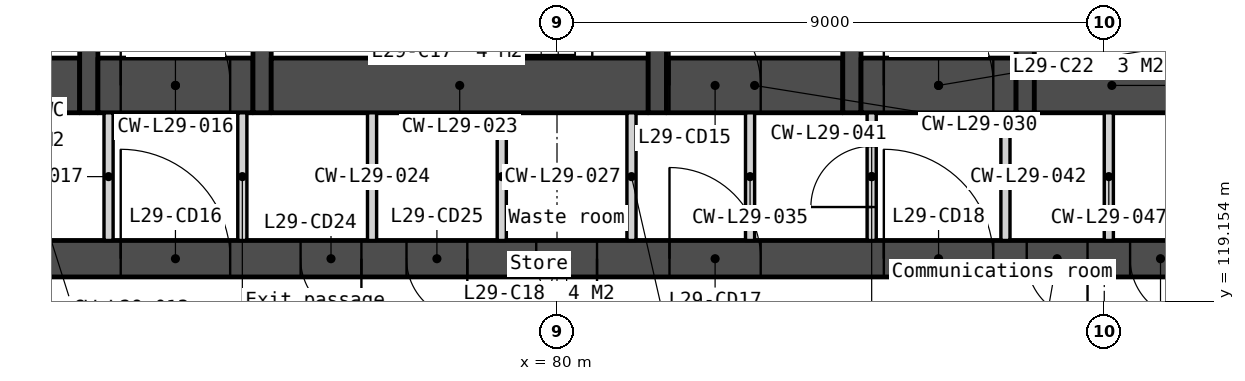
"""IFC4 building model, lengths in metres.
Left out: names, types, materials, properties, quantities, classifications, styles, units other than length and angle.
Written with IfcOpenShell. Run it as: python <this file> out.ifc"""

import sys

from ifc_helpers import new_model, si_unit, direction, frame, frame_2d, origin, place, context, subcontext, project, spatial, polyline, rectangle, outline, extrude, element, fill, save


model = new_model("IFC4")
c1 = context("Model", 3, precision=1e-05, world=origin(), true_north=direction((0.0, 1.0)))
c2 = subcontext(c1, "Body", "Model", "MODEL_VIEW")
j1 = project(units=[si_unit("LENGTHUNIT", "METRE"), si_unit("PLANEANGLEUNIT", "RADIAN")], contexts=[c1])
p1 = place(None, origin())
s1 = spatial("IfcSite", under=j1, at=p1, CompositionType="ELEMENT")
p2 = place(p1, origin())
s2 = spatial("IfcBuilding", under=s1, at=p2, CompositionType="ELEMENT")
p3 = place(p2, frame((0.0, 0.0, 116.8)))
s3 = spatial("IfcBuildingStorey", under=s2, at=p3, CompositionType="ELEMENT", Elevation=116.8)
p4 = place(p3, frame((66.0, 119.85, 0.0), z_axis=(0.0, 0.0, 1.0), x_axis=(1.0, 0.0, 0.0)))
e1 = element("IfcWall", 1, at=p4, inside=s3, PredefinedType="SOLIDWALL", context=c2, shape_type="SweptSolid", body=[
    extrude(rectangle(XDim=28.0, YDim=0.6, at=frame_2d((14.0, 0.0))), origin(), (0.0, 0.0, 1.0), 3.35),
])
p5 = place(p4, frame((6.825, 0.0, 0.0)))
e2 = element("IfcOpeningElement", 2, at=p5, cuts=e1, PredefinedType="OPENING", context=c2, shape_type="SweptSolid", body=[
    extrude(rectangle(XDim=1.8, YDim=2.1, at=frame_2d((0.9, 1.05))), frame((0.0, 0.31, 0.0), z_axis=(0.0, -1.0, 0.0), x_axis=(1.0, 0.0, 0.0)), (0.0, 0.0, 1.0), 0.62),
])
p6 = place(p4, frame((15.85, 0.0, 0.0)))
e3 = element("IfcOpeningElement", 3, at=p6, cuts=e1, PredefinedType="OPENING", context=c2, shape_type="SweptSolid", body=[
    extrude(rectangle(XDim=1.5, YDim=2.1, at=frame_2d((0.75, 1.05))), frame((0.0, 0.31, 0.0), z_axis=(0.0, -1.0, 0.0), x_axis=(1.0, 0.0, 0.0)), (0.0, 0.0, 1.0), 0.62),
])
p7 = place(p4, frame((19.375, 0.0, 0.0)))
e4 = element("IfcOpeningElement", 4, at=p7, cuts=e1, PredefinedType="OPENING", context=c2, shape_type="SweptSolid", body=[
    extrude(rectangle(XDim=1.8, YDim=2.1, at=frame_2d((0.9, 1.05))), frame((0.0, 0.31, 0.0), z_axis=(0.0, -1.0, 0.0), x_axis=(1.0, 0.0, 0.0)), (0.0, 0.0, 1.0), 0.62),
])
p8 = place(p4, frame((4.425, 0.0, 0.0)))
e5 = element("IfcOpeningElement", 5, at=p8, cuts=e1, PredefinedType="OPENING", context=c2, shape_type="SweptSolid", body=[
    extrude(rectangle(XDim=1.0, YDim=2.1, at=frame_2d((0.5, 1.05))), frame((0.0, 0.31, 0.0), z_axis=(0.0, -1.0, 0.0), x_axis=(1.0, 0.0, 0.0)), (0.0, 0.0, 1.0), 0.62),
])
p9 = place(p4, frame((9.783, 0.0, 0.0)))
e6 = element("IfcOpeningElement", 6, at=p9, cuts=e1, PredefinedType="OPENING", context=c2, shape_type="SweptSolid", body=[
    extrude(rectangle(XDim=1.0, YDim=2.1, at=frame_2d((0.5, 1.05))), frame((0.0, 0.31, 0.0), z_axis=(0.0, -1.0, 0.0), x_axis=(1.0, 0.0, 0.0)), (0.0, 0.0, 1.0), 0.62),
])
p10 = place(p4, frame((11.525, 0.0, 0.0)))
e7 = element("IfcOpeningElement", 7, at=p10, cuts=e1, PredefinedType="OPENING", context=c2, shape_type="SweptSolid", body=[
    extrude(rectangle(XDim=1.0, YDim=2.1, at=frame_2d((0.5, 1.05))), frame((0.0, 0.31, 0.0), z_axis=(0.0, -1.0, 0.0), x_axis=(1.0, 0.0, 0.0)), (0.0, 0.0, 1.0), 0.62),
])
p11 = place(p4, frame((13.658, 0.0, 0.0)))
e8 = element("IfcOpeningElement", 8, at=p11, cuts=e1, PredefinedType="OPENING", context=c2, shape_type="SweptSolid", body=[
    extrude(rectangle(XDim=1.0, YDim=2.1, at=frame_2d((0.5, 1.05))), frame((0.0, 0.31, 0.0), z_axis=(0.0, -1.0, 0.0), x_axis=(1.0, 0.0, 0.0)), (0.0, 0.0, 1.0), 0.62),
])
p12 = place(p4, frame((21.725, 0.0, 0.0)))
e9 = element("IfcOpeningElement", 9, at=p12, cuts=e1, PredefinedType="OPENING", context=c2, shape_type="SweptSolid", body=[
    extrude(rectangle(XDim=1.0, YDim=2.1, at=frame_2d((0.5, 1.05))), frame((0.0, 0.31, 0.0), z_axis=(0.0, -1.0, 0.0), x_axis=(1.0, 0.0, 0.0)), (0.0, 0.0, 1.0), 0.62),
])
p13 = place(p4, frame((23.425, 0.0, 0.0)))
e10 = element("IfcOpeningElement", 10, at=p13, cuts=e1, PredefinedType="OPENING", context=c2, shape_type="SweptSolid", body=[
    extrude(rectangle(XDim=1.0, YDim=2.1, at=frame_2d((0.5, 1.05))), frame((0.0, 0.31, 0.0), z_axis=(0.0, -1.0, 0.0), x_axis=(1.0, 0.0, 0.0)), (0.0, 0.0, 1.0), 0.62),
])
p14 = place(p3, frame((69.6, 122.7, 0.0), z_axis=(0.0, 0.0, 1.0), x_axis=(1.0, 0.0, 0.0)))
e11 = element("IfcWall", 11, at=p14, inside=s3, PredefinedType="SOLIDWALL", context=c2, shape_type="SweptSolid", body=[
    extrude(rectangle(XDim=2.55, YDim=0.9, at=frame_2d((1.275, 0.0))), origin(), (0.0, 0.0, 1.0), 3.35),
])
p15 = place(p3, frame((72.3, 133.95, 0.0), z_axis=(0.0, 0.0, 1.0), x_axis=(0.0, -1.0, 0.0)))
e12 = element("IfcWall", 12, at=p15, inside=s3, PredefinedType="SOLIDWALL", context=c2, shape_type="SweptSolid", body=[
    extrude(rectangle(XDim=11.7, YDim=0.3, at=frame_2d((5.85, 0.0))), origin(), (0.0, 0.0, 1.0), 3.35),
])
p16 = place(p15, frame((6.95, 0.0, 0.0)))
e13 = element("IfcOpeningElement", 13, at=p16, cuts=e12, PredefinedType="OPENING", context=c2, shape_type="SweptSolid", body=[
    extrude(rectangle(XDim=1.1, YDim=2.1, at=frame_2d((0.55, 1.05))), frame((0.0, 0.16, 0.0), z_axis=(0.0, -1.0, 0.0), x_axis=(1.0, 0.0, 0.0)), (0.0, 0.0, 1.0), 0.32),
])
p17 = place(p15, frame((9.35, 0.0, 0.0)))
e14 = element("IfcOpeningElement", 14, at=p17, cuts=e12, PredefinedType="OPENING", context=c2, shape_type="SweptSolid", body=[
    extrude(rectangle(XDim=0.9, YDim=2.1, at=frame_2d((0.45, 1.05))), frame((0.0, 0.16, 0.0), z_axis=(0.0, -1.0, 0.0), x_axis=(1.0, 0.0, 0.0)), (0.0, 0.0, 1.0), 0.32),
])
p18 = place(p15, frame((5.1, 0.0, 0.0)))
e15 = element("IfcOpeningElement", 15, at=p18, cuts=e12, PredefinedType="OPENING", context=c2, shape_type="SweptSolid", body=[
    extrude(rectangle(XDim=1.0, YDim=2.1, at=frame_2d((0.5, 1.05))), frame((0.0, 0.16, 0.0), z_axis=(0.0, -1.0, 0.0), x_axis=(1.0, 0.0, 0.0)), (0.0, 0.0, 1.0), 0.32),
])
p19 = place(p3, frame((72.45, 122.7, 0.0), z_axis=(0.0, 0.0, 1.0), x_axis=(1.0, 0.0, 0.0)))
e16 = element("IfcWall", 16, at=p19, inside=s3, PredefinedType="SOLIDWALL", context=c2, shape_type="SweptSolid", body=[
    extrude(rectangle(XDim=2.55, YDim=0.9, at=frame_2d((1.275, 0.0))), origin(), (0.0, 0.0, 1.0), 3.35),
])
p20 = place(p19, frame((0.375, 0.0, 0.0)))
e17 = element("IfcOpeningElement", 17, at=p20, cuts=e16, PredefinedType="OPENING", context=c2, shape_type="SweptSolid", body=[
    extrude(rectangle(XDim=1.8, YDim=2.1, at=frame_2d((0.9, 1.05))), frame((0.0, 0.46, 0.0), z_axis=(0.0, -1.0, 0.0), x_axis=(1.0, 0.0, 0.0)), (0.0, 0.0, 1.0), 0.92),
])
for number, where, z_axis, x_axis in (
    (18, (72.625, 122.25, 0.0), (0.0, 0.0, 1.0), (0.0, -1.0, 0.0)),
    (19, (74.825, 122.25, 0.0), (0.0, 0.0, 1.0), (0.0, -1.0, 0.0)),
):
    element("IfcWall", number, at=place(p3, frame(where, z_axis=z_axis, x_axis=x_axis)), inside=s3, PredefinedType="PARTITIONING", context=c2, shape_type="SweptSolid", body=[
        extrude(rectangle(XDim=2.1, YDim=0.15, at=frame_2d((1.05, 0.0))), origin(), (0.0, 0.0, 1.0), 3.35),
    ])
p21 = place(p3, frame((75.15, 133.95, 0.0), z_axis=(0.0, 0.0, 1.0), x_axis=(0.0, -1.0, 0.0)))
e20 = element("IfcWall", 20, at=p21, inside=s3, PredefinedType="SOLIDWALL", context=c2, shape_type="SweptSolid", body=[
    extrude(rectangle(XDim=11.7, YDim=0.3, at=frame_2d((5.85, 0.0))), origin(), (0.0, 0.0, 1.0), 3.35),
])
p22 = place(p3, frame((75.3, 122.7, 0.0), z_axis=(0.0, 0.0, 1.0), x_axis=(1.0, 0.0, 0.0)))
e21 = element("IfcWall", 21, at=p22, inside=s3, PredefinedType="SOLIDWALL", context=c2, shape_type="SweptSolid", body=[
    extrude(rectangle(XDim=6.2, YDim=0.9, at=frame_2d((3.1, 0.0))), origin(), (0.0, 0.0, 1.0), 3.35),
])
for number, where, z_axis, x_axis in (
    (22, (76.958, 122.25, 0.0), (0.0, 0.0, 1.0), (0.0, -1.0, 0.0)),
    (23, (79.092, 122.25, 0.0), (0.0, 0.0, 1.0), (0.0, -1.0, 0.0)),
    (24, (81.225, 122.25, 0.0), (0.0, 0.0, 1.0), (0.0, -1.0, 0.0)),
):
    element("IfcWall", number, at=place(p3, frame(where, z_axis=z_axis, x_axis=x_axis)), inside=s3, PredefinedType="PARTITIONING", context=c2, shape_type="SweptSolid", body=[
        extrude(rectangle(XDim=2.1, YDim=0.15, at=frame_2d((1.05, 0.0))), origin(), (0.0, 0.0, 1.0), 3.35),
    ])
p23 = place(p3, frame((81.65, 125.7, 0.0), z_axis=(0.0, 0.0, 1.0), x_axis=(0.0, -1.0, 0.0)))
e25 = element("IfcWall", 25, at=p23, inside=s3, PredefinedType="SOLIDWALL", context=c2, shape_type="SweptSolid", body=[
    extrude(rectangle(XDim=3.45, YDim=0.3, at=frame_2d((1.725, 0.0))), origin(), (0.0, 0.0, 1.0), 3.35),
])
p24 = place(p23, frame((0.75, 0.0, 0.0)))
e26 = element("IfcOpeningElement", 26, at=p24, cuts=e25, PredefinedType="OPENING", context=c2, shape_type="SweptSolid", body=[
    extrude(rectangle(XDim=1.0, YDim=2.1, at=frame_2d((0.5, 1.05))), frame((0.0, 0.16, 0.0), z_axis=(0.0, -1.0, 0.0), x_axis=(1.0, 0.0, 0.0)), (0.0, 0.0, 1.0), 0.32),
])
p25 = place(p3, frame((81.8, 122.7, 0.0), z_axis=(0.0, 0.0, 1.0), x_axis=(1.0, 0.0, 0.0)))
e27 = element("IfcWall", 27, at=p25, inside=s3, PredefinedType="SOLIDWALL", context=c2, shape_type="SweptSolid", body=[
    extrude(rectangle(XDim=2.9, YDim=0.9, at=frame_2d((1.45, 0.0))), origin(), (0.0, 0.0, 1.0), 3.35),
])
p26 = place(p25, frame((0.05, 0.0, 0.0)))
e28 = element("IfcOpeningElement", 28, at=p26, cuts=e27, PredefinedType="OPENING", context=c2, shape_type="SweptSolid", body=[
    extrude(rectangle(XDim=1.5, YDim=2.1, at=frame_2d((0.75, 1.05))), frame((0.0, 0.46, 0.0), z_axis=(0.0, -1.0, 0.0), x_axis=(1.0, 0.0, 0.0)), (0.0, 0.0, 1.0), 0.92),
])
p27 = place(p3, frame((83.175, 122.25, 0.0), z_axis=(0.0, 0.0, 1.0), x_axis=(0.0, -1.0, 0.0)))
e29 = element("IfcWall", 29, at=p27, inside=s3, PredefinedType="PARTITIONING", context=c2, shape_type="SweptSolid", body=[
    extrude(rectangle(XDim=2.1, YDim=0.15, at=frame_2d((1.05, 0.0))), origin(), (0.0, 0.0, 1.0), 3.35),
])
p28 = place(p3, frame((84.85, 133.95, 0.0), z_axis=(0.0, 0.0, 1.0), x_axis=(0.0, -1.0, 0.0)))
e30 = element("IfcWall", 30, at=p28, inside=s3, PredefinedType="SOLIDWALL", context=c2, shape_type="SweptSolid", body=[
    extrude(rectangle(XDim=11.7, YDim=0.3, at=frame_2d((5.85, 0.0))), origin(), (0.0, 0.0, 1.0), 3.35),
])
p29 = place(p3, frame((85.0, 122.7, 0.0), z_axis=(0.0, 0.0, 1.0), x_axis=(1.0, 0.0, 0.0)))
e31 = element("IfcWall", 31, at=p29, inside=s3, PredefinedType="SOLIDWALL", context=c2, shape_type="SweptSolid", body=[
    extrude(rectangle(XDim=2.55, YDim=0.9, at=frame_2d((1.275, 0.0))), origin(), (0.0, 0.0, 1.0), 3.35),
])
p30 = place(p29, frame((0.375, 0.0, 0.0)))
e32 = element("IfcOpeningElement", 32, at=p30, cuts=e31, PredefinedType="OPENING", context=c2, shape_type="SweptSolid", body=[
    extrude(rectangle(XDim=1.8, YDim=2.1, at=frame_2d((0.9, 1.05))), frame((0.0, 0.46, 0.0), z_axis=(0.0, -1.0, 0.0), x_axis=(1.0, 0.0, 0.0)), (0.0, 0.0, 1.0), 0.92),
])
p31 = place(p3, frame((85.175, 122.25, 0.0), z_axis=(0.0, 0.0, 1.0), x_axis=(0.0, -1.0, 0.0)))
e33 = element("IfcWall", 33, at=p31, inside=s3, PredefinedType="PARTITIONING", context=c2, shape_type="SweptSolid", body=[
    extrude(rectangle(XDim=2.1, YDim=0.15, at=frame_2d((1.05, 0.0))), origin(), (0.0, 0.0, 1.0), 3.35),
])
p32 = place(p31, frame((0.55, 0.0, 0.0)))
e34 = element("IfcOpeningElement", 34, at=p32, cuts=e33, PredefinedType="OPENING", context=c2, shape_type="SweptSolid", body=[
    extrude(rectangle(XDim=1.0, YDim=2.1, at=frame_2d((0.5, 1.05))), frame((0.0, 0.085, 0.0), z_axis=(0.0, -1.0, 0.0), x_axis=(1.0, 0.0, 0.0)), (0.0, 0.0, 1.0), 0.17),
])
p33 = place(p3, frame((87.375, 122.25, 0.0), z_axis=(0.0, 0.0, 1.0), x_axis=(0.0, -1.0, 0.0)))
e35 = element("IfcWall", 35, at=p33, inside=s3, PredefinedType="PARTITIONING", context=c2, shape_type="SweptSolid", body=[
    extrude(rectangle(XDim=2.1, YDim=0.15, at=frame_2d((1.05, 0.0))), origin(), (0.0, 0.0, 1.0), 3.35),
])
p34 = place(p3, frame((87.7, 133.95, 0.0), z_axis=(0.0, 0.0, 1.0), x_axis=(0.0, -1.0, 0.0)))
e36 = element("IfcWall", 36, at=p34, inside=s3, PredefinedType="SOLIDWALL", context=c2, shape_type="SweptSolid", body=[
    extrude(rectangle(XDim=11.7, YDim=0.3, at=frame_2d((5.85, 0.0))), origin(), (0.0, 0.0, 1.0), 3.35),
])
p35 = place(p34, frame((6.95, 0.0, 0.0)))
e37 = element("IfcOpeningElement", 37, at=p35, cuts=e36, PredefinedType="OPENING", context=c2, shape_type="SweptSolid", body=[
    extrude(rectangle(XDim=1.1, YDim=2.1, at=frame_2d((0.55, 1.05))), frame((0.0, 0.16, 0.0), z_axis=(0.0, -1.0, 0.0), x_axis=(1.0, 0.0, 0.0)), (0.0, 0.0, 1.0), 0.32),
])
p36 = place(p34, frame((5.1, 0.0, 0.0)))
e38 = element("IfcOpeningElement", 38, at=p36, cuts=e36, PredefinedType="OPENING", context=c2, shape_type="SweptSolid", body=[
    extrude(rectangle(XDim=1.0, YDim=2.1, at=frame_2d((0.5, 1.05))), frame((0.0, 0.16, 0.0), z_axis=(0.0, -1.0, 0.0), x_axis=(1.0, 0.0, 0.0)), (0.0, 0.0, 1.0), 0.32),
])
p37 = place(p34, frame((9.25, 0.0, 0.0)))
e39 = element("IfcOpeningElement", 39, at=p37, cuts=e36, PredefinedType="OPENING", context=c2, shape_type="SweptSolid", body=[
    extrude(rectangle(XDim=1.1, YDim=2.1, at=frame_2d((0.55, 1.05))), frame((0.0, 0.16, 0.0), z_axis=(0.0, -1.0, 0.0), x_axis=(1.0, 0.0, 0.0)), (0.0, 0.0, 1.0), 0.32),
])
p38 = place(p3, frame((87.85, 122.7, 0.0), z_axis=(0.0, 0.0, 1.0), x_axis=(1.0, 0.0, 0.0)))
e40 = element("IfcWall", 40, at=p38, inside=s3, PredefinedType="SOLIDWALL", context=c2, shape_type="SweptSolid", body=[
    extrude(rectangle(XDim=2.55, YDim=0.9, at=frame_2d((1.275, 0.0))), origin(), (0.0, 0.0, 1.0), 3.35),
])
p39 = place(p3, frame((89.075, 122.25, 0.0), z_axis=(0.0, 0.0, 1.0), x_axis=(0.0, -1.0, 0.0)))
e41 = element("IfcWall", 41, at=p39, inside=s3, PredefinedType="PARTITIONING", context=c2, shape_type="SweptSolid", body=[
    extrude(rectangle(XDim=2.1, YDim=0.15, at=frame_2d((1.05, 0.0))), origin(), (0.0, 0.0, 1.0), 3.35),
])
p40 = place(p3, frame((56.073, 130.263, -0.15), z_axis=(0.0, 0.0, 1.0), x_axis=(0.500000478905, -0.866025127289, 0.0)))
e42 = element("IfcWall", 42, at=p40, inside=s3, PredefinedType="SOLIDWALL", context=c2, shape_type="SweptSolid", body=[
    extrude(outline(polyline([(42.643, 0.0), (42.643, 3.5), (0.0, 3.5), (0.0, 0.0), (42.643, 0.0)])), frame((0.0, 0.225, 0.0), z_axis=(0.0, -1.0, 0.0), x_axis=(1.0, 0.0, 0.0)), (0.0, 0.0, 1.0), 0.45),
])
p41 = place(p40, frame((0.72, 0.0, 1.05)))
e43 = element("IfcOpeningElement", 43, at=p41, cuts=e42, PredefinedType="OPENING", context=c2, shape_type="SweptSolid", body=[
    extrude(rectangle(XDim=1.2, YDim=1.5, at=frame_2d((0.6, 0.75))), frame((0.0, 0.235, 0.0), z_axis=(0.0, -1.0, 0.0), x_axis=(1.0, 0.0, 0.0)), (0.0, 0.0, 1.0), 0.47),
])
p42 = place(p40, frame((7.079, 0.0, 1.05)))
e44 = element("IfcOpeningElement", 44, at=p42, cuts=e42, PredefinedType="OPENING", context=c2, shape_type="SweptSolid", body=[
    extrude(rectangle(XDim=1.2, YDim=1.5, at=frame_2d((0.6, 0.75))), frame((0.0, 0.235, 0.0), z_axis=(0.0, -1.0, 0.0), x_axis=(1.0, 0.0, 0.0)), (0.0, 0.0, 1.0), 0.47),
])
p43 = place(p40, frame((8.779, 0.0, 1.05)))
e45 = element("IfcOpeningElement", 45, at=p43, cuts=e42, PredefinedType="OPENING", context=c2, shape_type="SweptSolid", body=[
    extrude(rectangle(XDim=1.2, YDim=1.5, at=frame_2d((0.6, 0.75))), frame((0.0, 0.235, 0.0), z_axis=(0.0, -1.0, 0.0), x_axis=(1.0, 0.0, 0.0)), (0.0, 0.0, 1.0), 0.47),
])
p44 = place(p40, frame((15.607, 0.0, 1.05)))
e46 = element("IfcOpeningElement", 46, at=p44, cuts=e42, PredefinedType="OPENING", context=c2, shape_type="SweptSolid", body=[
    extrude(rectangle(XDim=1.2, YDim=1.5, at=frame_2d((0.6, 0.75))), frame((0.0, 0.235, 0.0), z_axis=(0.0, -1.0, 0.0), x_axis=(1.0, 0.0, 0.0)), (0.0, 0.0, 1.0), 0.47),
])
p45 = place(p40, frame((17.307, 0.0, 1.05)))
e47 = element("IfcOpeningElement", 47, at=p45, cuts=e42, PredefinedType="OPENING", context=c2, shape_type="SweptSolid", body=[
    extrude(rectangle(XDim=1.2, YDim=1.5, at=frame_2d((0.6, 0.75))), frame((0.0, 0.235, 0.0), z_axis=(0.0, -1.0, 0.0), x_axis=(1.0, 0.0, 0.0)), (0.0, 0.0, 1.0), 0.47),
])
p46 = place(p40, frame((24.136, 0.0, 1.05)))
e48 = element("IfcOpeningElement", 48, at=p46, cuts=e42, PredefinedType="OPENING", context=c2, shape_type="SweptSolid", body=[
    extrude(rectangle(XDim=1.2, YDim=1.5, at=frame_2d((0.6, 0.75))), frame((0.0, 0.235, 0.0), z_axis=(0.0, -1.0, 0.0), x_axis=(1.0, 0.0, 0.0)), (0.0, 0.0, 1.0), 0.47),
])
p47 = place(p40, frame((25.836, 0.0, 1.05)))
e49 = element("IfcOpeningElement", 49, at=p47, cuts=e42, PredefinedType="OPENING", context=c2, shape_type="SweptSolid", body=[
    extrude(rectangle(XDim=1.2, YDim=1.5, at=frame_2d((0.6, 0.75))), frame((0.0, 0.235, 0.0), z_axis=(0.0, -1.0, 0.0), x_axis=(1.0, 0.0, 0.0)), (0.0, 0.0, 1.0), 0.47),
])
p48 = place(p40, frame((32.665, 0.0, 1.05)))
e50 = element("IfcOpeningElement", 50, at=p48, cuts=e42, PredefinedType="OPENING", context=c2, shape_type="SweptSolid", body=[
    extrude(rectangle(XDim=1.2, YDim=1.5, at=frame_2d((0.6, 0.75))), frame((0.0, 0.235, 0.0), z_axis=(0.0, -1.0, 0.0), x_axis=(1.0, 0.0, 0.0)), (0.0, 0.0, 1.0), 0.47),
])
p49 = place(p40, frame((34.365, 0.0, 1.05)))
e51 = element("IfcOpeningElement", 51, at=p49, cuts=e42, PredefinedType="OPENING", context=c2, shape_type="SweptSolid", body=[
    extrude(rectangle(XDim=1.2, YDim=1.5, at=frame_2d((0.6, 0.75))), frame((0.0, 0.235, 0.0), z_axis=(0.0, -1.0, 0.0), x_axis=(1.0, 0.0, 0.0)), (0.0, 0.0, 1.0), 0.47),
])
p50 = place(p40, frame((40.722, 0.0, 1.05)))
e52 = element("IfcOpeningElement", 52, at=p50, cuts=e42, PredefinedType="OPENING", context=c2, shape_type="SweptSolid", body=[
    extrude(rectangle(XDim=1.2, YDim=1.5, at=frame_2d((0.6, 0.75))), frame((0.0, 0.235, 0.0), z_axis=(0.0, -1.0, 0.0), x_axis=(1.0, 0.0, 0.0)), (0.0, 0.0, 1.0), 0.47),
])
p51 = place(p30, origin())
e53 = element("IfcDoor", 53, at=p51, inside=s3, OperationType="DOUBLE_DOOR_DOUBLE_SWING", PredefinedType="DOOR", context=c2, shape_type="SweptSolid", body=[
    extrude(rectangle(XDim=1.8, YDim=2.1, at=frame_2d((0.9, 1.05))), frame((0.0, 0.025, 0.0), z_axis=(0.0, -1.0, 0.0), x_axis=(1.0, 0.0, 0.0)), (0.0, 0.0, 1.0), 0.05),
])
fill(e32, e53)
p52 = place(p20, origin())
e54 = element("IfcDoor", 54, at=p52, inside=s3, OperationType="DOUBLE_DOOR_DOUBLE_SWING", PredefinedType="DOOR", context=c2, shape_type="SweptSolid", body=[
    extrude(rectangle(XDim=1.8, YDim=2.1, at=frame_2d((0.9, 1.05))), frame((0.0, 0.025, 0.0), z_axis=(0.0, -1.0, 0.0), x_axis=(1.0, 0.0, 0.0)), (0.0, 0.0, 1.0), 0.05),
])
fill(e17, e54)
p53 = place(p26, origin())
e55 = element("IfcDoor", 55, at=p53, inside=s3, OperationType="DOUBLE_DOOR_DOUBLE_SWING", PredefinedType="DOOR", context=c2, shape_type="SweptSolid", body=[
    extrude(rectangle(XDim=1.5, YDim=2.1, at=frame_2d((0.75, 1.05))), frame((0.0, 0.025, 0.0), z_axis=(0.0, -1.0, 0.0), x_axis=(1.0, 0.0, 0.0)), (0.0, 0.0, 1.0), 0.05),
])
fill(e28, e55)
p54 = place(p5, origin())
e56 = element("IfcDoor", 56, at=p54, inside=s3, OperationType="DOUBLE_DOOR_DOUBLE_SWING", PredefinedType="DOOR", context=c2, shape_type="SweptSolid", body=[
    extrude(rectangle(XDim=1.8, YDim=2.1, at=frame_2d((0.9, 1.05))), frame((0.0, 0.025, 0.0), z_axis=(0.0, -1.0, 0.0), x_axis=(1.0, 0.0, 0.0)), (0.0, 0.0, 1.0), 0.05),
])
fill(e2, e56)
p55 = place(p6, origin())
e57 = element("IfcDoor", 57, at=p55, inside=s3, OperationType="DOUBLE_DOOR_DOUBLE_SWING", PredefinedType="DOOR", context=c2, shape_type="SweptSolid", body=[
    extrude(rectangle(XDim=1.5, YDim=2.1, at=frame_2d((0.75, 1.05))), frame((0.0, 0.025, 0.0), z_axis=(0.0, -1.0, 0.0), x_axis=(1.0, 0.0, 0.0)), (0.0, 0.0, 1.0), 0.05),
])
fill(e3, e57)
p56 = place(p7, origin())
e58 = element("IfcDoor", 58, at=p56, inside=s3, OperationType="DOUBLE_DOOR_DOUBLE_SWING", PredefinedType="DOOR", context=c2, shape_type="SweptSolid", body=[
    extrude(rectangle(XDim=1.8, YDim=2.1, at=frame_2d((0.9, 1.05))), frame((0.0, 0.025, 0.0), z_axis=(0.0, -1.0, 0.0), x_axis=(1.0, 0.0, 0.0)), (0.0, 0.0, 1.0), 0.05),
])
fill(e4, e58)
p57 = place(p9, origin())
e59 = element("IfcDoor", 59, at=p57, inside=s3, OperationType="SINGLE_SWING_RIGHT", PredefinedType="DOOR", context=c2, shape_type="SweptSolid", body=[
    extrude(rectangle(XDim=1.0, YDim=2.1, at=frame_2d((0.5, 1.05))), frame((0.0, 0.025, 0.0), z_axis=(0.0, -1.0, 0.0), x_axis=(1.0, 0.0, 0.0)), (0.0, 0.0, 1.0), 0.05),
])
fill(e6, e59)
p58 = place(p10, origin())
e60 = element("IfcDoor", 60, at=p58, inside=s3, OperationType="SINGLE_SWING_RIGHT", PredefinedType="DOOR", context=c2, shape_type="SweptSolid", body=[
    extrude(rectangle(XDim=1.0, YDim=2.1, at=frame_2d((0.5, 1.05))), frame((0.0, 0.025, 0.0), z_axis=(0.0, -1.0, 0.0), x_axis=(1.0, 0.0, 0.0)), (0.0, 0.0, 1.0), 0.05),
])
fill(e7, e60)
p59 = place(p11, origin())
e61 = element("IfcDoor", 61, at=p59, inside=s3, OperationType="SINGLE_SWING_RIGHT", PredefinedType="DOOR", context=c2, shape_type="SweptSolid", body=[
    extrude(rectangle(XDim=1.0, YDim=2.1, at=frame_2d((0.5, 1.05))), frame((0.0, 0.025, 0.0), z_axis=(0.0, -1.0, 0.0), x_axis=(1.0, 0.0, 0.0)), (0.0, 0.0, 1.0), 0.05),
])
fill(e8, e61)
p60 = place(p32, origin())
e62 = element("IfcDoor", 62, at=p60, inside=s3, OperationType="SINGLE_SWING_RIGHT", PredefinedType="DOOR", context=c2, shape_type="SweptSolid", body=[
    extrude(rectangle(XDim=1.0, YDim=2.1, at=frame_2d((0.5, 1.05))), frame((0.0, 0.025, 0.0), z_axis=(0.0, -1.0, 0.0), x_axis=(1.0, 0.0, 0.0)), (0.0, 0.0, 1.0), 0.05),
])
fill(e34, e62)
p61 = place(p12, origin())
e63 = element("IfcDoor", 63, at=p61, inside=s3, OperationType="SINGLE_SWING_RIGHT", PredefinedType="DOOR", context=c2, shape_type="SweptSolid", body=[
    extrude(rectangle(XDim=1.0, YDim=2.1, at=frame_2d((0.5, 1.05))), frame((0.0, 0.025, 0.0), z_axis=(0.0, -1.0, 0.0), x_axis=(1.0, 0.0, 0.0)), (0.0, 0.0, 1.0), 0.05),
])
fill(e9, e63)
p62 = place(p13, origin())
e64 = element("IfcDoor", 64, at=p62, inside=s3, OperationType="SINGLE_SWING_RIGHT", PredefinedType="DOOR", context=c2, shape_type="SweptSolid", body=[
    extrude(rectangle(XDim=1.0, YDim=2.1, at=frame_2d((0.5, 1.05))), frame((0.0, 0.025, 0.0), z_axis=(0.0, -1.0, 0.0), x_axis=(1.0, 0.0, 0.0)), (0.0, 0.0, 1.0), 0.05),
])
fill(e10, e64)
save(model, sys.argv[1])
